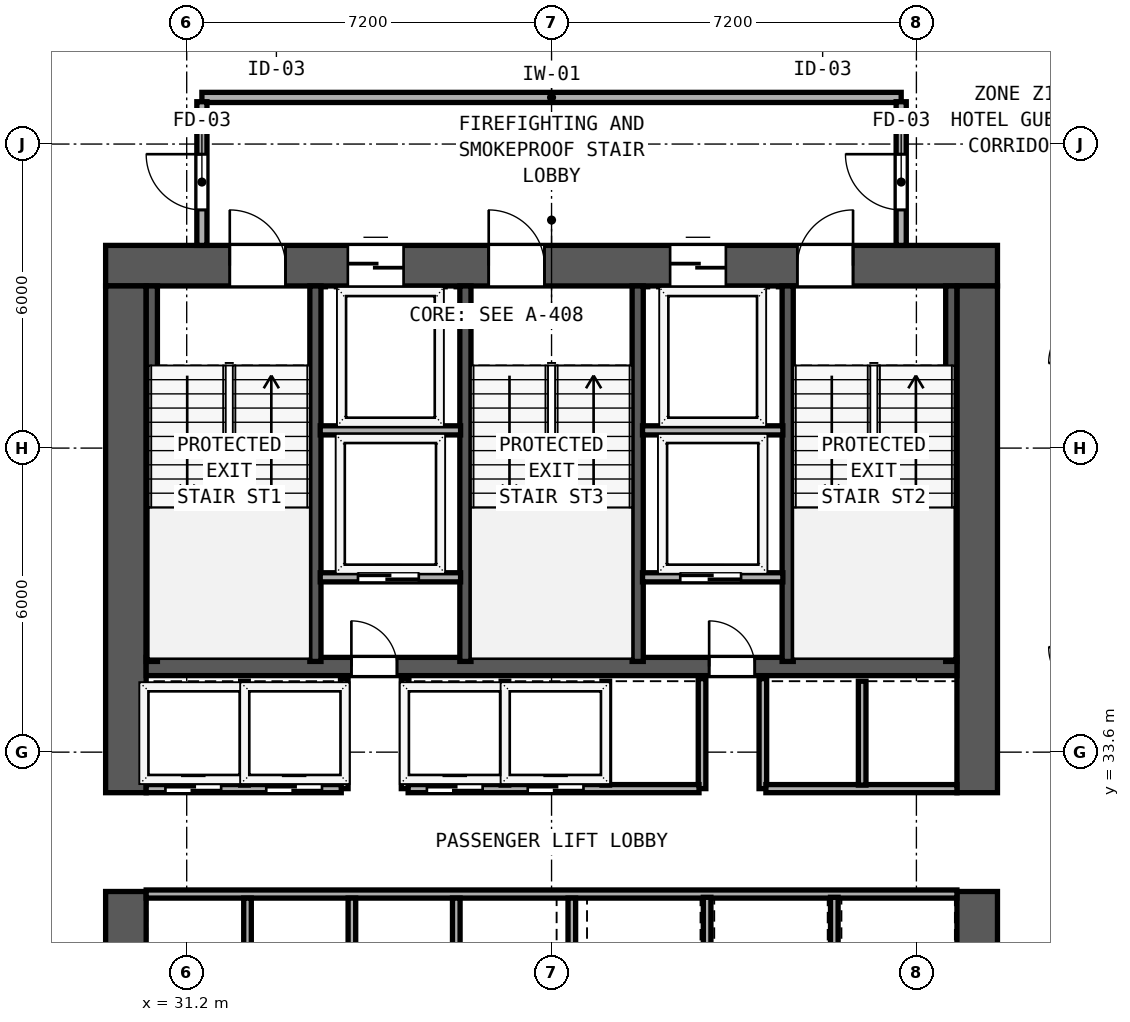
"""IFC4 building model, lengths in metres.
Left out: names, types, materials, properties, quantities, classifications, styles, units other than length and angle.
Written with IfcOpenShell. Run it as: python <this file> out.ifc"""

import sys

from ifc_helpers import new_model, si_unit, direction, frame, frame_2d, origin, place, context, subcontext, project, spatial, rectangle, extrude, element, fill, save


model = new_model("IFC4")
c1 = context("Model", 3, precision=1e-05, world=origin(), true_north=direction((0.0, 1.0)))
c2 = subcontext(c1, "Body", "Model", "MODEL_VIEW")
j1 = project(units=[si_unit("LENGTHUNIT", "METRE"), si_unit("PLANEANGLEUNIT", "RADIAN")], contexts=[c1])
p1 = place(None, origin())
s1 = spatial("IfcSite", under=j1, at=p1, CompositionType="ELEMENT")
p2 = place(p1, origin())
s2 = spatial("IfcBuilding", under=s1, at=p2, CompositionType="ELEMENT")
p3 = place(p2, frame((0.0, 0.0, 31.6)))
s3 = spatial("IfcBuildingStorey", under=s2, at=p3, CompositionType="ELEMENT", Elevation=31.6)
p4 = place(p3, frame((29.6, 43.2, 0.0), z_axis=(0.0, 0.0, 1.0), x_axis=(1.0, 0.0, 0.0)))
e1 = element("IfcWall", 1, at=p4, inside=s3, PredefinedType="SHEAR", context=c2, shape_type="SweptSolid", body=[
    extrude(rectangle(XDim=17.6, YDim=0.8, at=frame_2d((8.8, 0.0))), origin(), (0.0, 0.0, 1.0), 3.6),
])
p5 = place(p4, frame((2.45, 0.0, 0.0)))
e2 = element("IfcOpeningElement", 2, at=p5, cuts=e1, PredefinedType="OPENING", context=c2, shape_type="SweptSolid", body=[
    extrude(rectangle(XDim=1.1, YDim=2.15, at=frame_2d((0.55, 1.075))), frame((0.0, 0.41, 0.0), z_axis=(0.0, -1.0, 0.0), x_axis=(1.0, 0.0, 0.0)), (0.0, 0.0, 1.0), 0.82),
])
p6 = place(p4, frame((7.56, 0.0, 0.0)))
e3 = element("IfcOpeningElement", 3, at=p6, cuts=e1, PredefinedType="OPENING", context=c2, shape_type="SweptSolid", body=[
    extrude(rectangle(XDim=1.1, YDim=2.15, at=frame_2d((0.55, 1.075))), frame((0.0, 0.41, 0.0), z_axis=(0.0, -1.0, 0.0), x_axis=(1.0, 0.0, 0.0)), (0.0, 0.0, 1.0), 0.82),
])
p7 = place(p4, frame((13.65, 0.0, 0.0)))
e4 = element("IfcOpeningElement", 4, at=p7, cuts=e1, PredefinedType="OPENING", context=c2, shape_type="SweptSolid", body=[
    extrude(rectangle(XDim=1.1, YDim=2.15, at=frame_2d((0.55, 1.075))), frame((0.0, 0.41, 0.0), z_axis=(0.0, -1.0, 0.0), x_axis=(1.0, 0.0, 0.0)), (0.0, 0.0, 1.0), 0.82),
])
p8 = place(p4, frame((4.78, 0.0, 0.0)))
e5 = element("IfcOpeningElement", 5, at=p8, cuts=e1, PredefinedType="OPENING", context=c2, shape_type="SweptSolid", body=[
    extrude(rectangle(XDim=1.1, YDim=2.2, at=frame_2d((0.55, 1.1))), frame((0.0, 0.41, 0.0), z_axis=(0.0, -1.0, 0.0), x_axis=(1.0, 0.0, 0.0)), (0.0, 0.0, 1.0), 0.82),
])
p9 = place(p4, frame((11.14, 0.0, 0.0)))
e6 = element("IfcOpeningElement", 6, at=p9, cuts=e1, PredefinedType="OPENING", context=c2, shape_type="SweptSolid", body=[
    extrude(rectangle(XDim=1.1, YDim=2.2, at=frame_2d((0.55, 1.1))), frame((0.0, 0.41, 0.0), z_axis=(0.0, -1.0, 0.0), x_axis=(1.0, 0.0, 0.0)), (0.0, 0.0, 1.0), 0.82),
])
p10 = place(p3, frame((30.0, 26.8, 0.0), z_axis=(0.0, 0.0, 1.0), x_axis=(0.0, 1.0, 0.0)))
e7 = element("IfcWall", 7, at=p10, inside=s3, PredefinedType="SHEAR", context=c2, shape_type="SweptSolid", body=[
    extrude(rectangle(XDim=4.05, YDim=0.8, at=frame_2d((2.025, 0.0))), origin(), (0.0, 0.0, 1.0), 3.6),
])
p11 = place(p3, frame((30.0, 32.8, 0.0), z_axis=(0.0, 0.0, 1.0), x_axis=(0.0, 1.0, 0.0)))
e8 = element("IfcWall", 8, at=p11, inside=s3, PredefinedType="SHEAR", context=c2, shape_type="SweptSolid", body=[
    extrude(rectangle(XDim=10.0, YDim=0.8, at=frame_2d((5.0, 0.0))), origin(), (0.0, 0.0, 1.0), 3.6),
])
p12 = place(p3, frame((46.8, 26.8, 0.0), z_axis=(0.0, 0.0, 1.0), x_axis=(0.0, 1.0, 0.0)))
e9 = element("IfcWall", 9, at=p12, inside=s3, PredefinedType="SHEAR", context=c2, shape_type="SweptSolid", body=[
    extrude(rectangle(XDim=4.05, YDim=0.8, at=frame_2d((2.025, 0.0))), origin(), (0.0, 0.0, 1.0), 3.6),
])
p13 = place(p3, frame((46.8, 32.8, 0.0), z_axis=(0.0, 0.0, 1.0), x_axis=(0.0, 1.0, 0.0)))
e10 = element("IfcWall", 10, at=p13, inside=s3, PredefinedType="SHEAR", context=c2, shape_type="SweptSolid", body=[
    extrude(rectangle(XDim=10.0, YDim=0.8, at=frame_2d((5.0, 0.0))), origin(), (0.0, 0.0, 1.0), 3.6),
])
p14 = place(p3, frame((30.4, 35.29, 0.0), z_axis=(0.0, 0.0, 1.0), x_axis=(1.0, 0.0, 0.0)))
e11 = element("IfcWall", 11, at=p14, inside=s3, PredefinedType="SHEAR", context=c2, shape_type="SweptSolid", body=[
    extrude(rectangle(XDim=16.0, YDim=0.36, at=frame_2d((8.0, 0.0))), origin(), (0.0, 0.0, 1.0), 3.6),
])
p15 = place(p14, frame((4.95, 0.0, 0.0), z_axis=(0.0, 0.0, 1.0), x_axis=(-1.0, 0.0, 0.0)))
e12 = element("IfcOpeningElement", 12, at=p15, cuts=e11, PredefinedType="OPENING", context=c2, shape_type="SweptSolid", body=[
    extrude(rectangle(XDim=0.9, YDim=2.1, at=frame_2d((0.45, 1.05))), frame((0.0, 0.19, 0.0), z_axis=(0.0, -1.0, 0.0), x_axis=(1.0, 0.0, 0.0)), (0.0, 0.0, 1.0), 0.38),
])
p16 = place(p14, frame((12.01, 0.0, 0.0), z_axis=(0.0, 0.0, 1.0), x_axis=(-1.0, 0.0, 0.0)))
e13 = element("IfcOpeningElement", 13, at=p16, cuts=e11, PredefinedType="OPENING", context=c2, shape_type="SweptSolid", body=[
    extrude(rectangle(XDim=0.9, YDim=2.1, at=frame_2d((0.45, 1.05))), frame((0.0, 0.19, 0.0), z_axis=(0.0, -1.0, 0.0), x_axis=(1.0, 0.0, 0.0)), (0.0, 0.0, 1.0), 0.38),
])
for number, where, z_axis, x_axis in (
    (14, (30.512, 35.39, 0.0), (0.0, 0.0, 1.0), (0.0, 1.0, 0.0)),
    (15, (33.74, 35.39, 0.0), (0.0, 0.0, 1.0), (0.0, 1.0, 0.0)),
    (16, (36.7, 35.39, 0.0), (0.0, 0.0, 1.0), (0.0, 1.0, 0.0)),
    (17, (40.1, 35.39, 0.0), (0.0, 0.0, 1.0), (0.0, 1.0, 0.0)),
    (18, (43.06, 35.39, 0.0), (0.0, 0.0, 1.0), (0.0, 1.0, 0.0)),
    (19, (46.288, 35.39, 0.0), (0.0, 0.0, 1.0), (0.0, 1.0, 0.0)),
):
    element("IfcWall", number, at=place(p3, frame(where, z_axis=z_axis, x_axis=x_axis)), inside=s3, PredefinedType="SHEAR", context=c2, shape_type="SweptSolid", body=[
        extrude(rectangle(XDim=7.41, YDim=0.22, at=frame_2d((3.705, 0.0))), origin(), (0.0, 0.0, 1.0), 3.6),
    ])
p17 = place(p3, frame((31.5, 46.52, 0.0), z_axis=(0.0, 0.0, 1.0), x_axis=(1.0, 0.0, 0.0)))
e20 = element("IfcWall", 20, at=p17, inside=s3, PredefinedType="SOLIDWALL", context=c2, shape_type="SweptSolid", body=[
    extrude(rectangle(XDim=13.8, YDim=0.2, at=frame_2d((6.9, 0.0))), origin(), (0.0, 0.0, 1.0), 3.6),
])
p18 = place(p3, frame((31.5, 43.6, 0.0), z_axis=(0.0, 0.0, 1.0), x_axis=(0.0, 1.0, 0.0)))
e21 = element("IfcWall", 21, at=p18, inside=s3, PredefinedType="SOLIDWALL", context=c2, shape_type="SweptSolid", body=[
    extrude(rectangle(XDim=2.835, YDim=0.2, at=frame_2d((1.417, 0.0))), origin(), (0.0, 0.0, 1.0), 3.6),
])
p19 = place(p18, frame((1.8, 0.0, 0.0), z_axis=(0.0, 0.0, 1.0), x_axis=(-1.0, 0.0, 0.0)))
e22 = element("IfcOpeningElement", 22, at=p19, cuts=e21, PredefinedType="OPENING", context=c2, shape_type="SweptSolid", body=[
    extrude(rectangle(XDim=1.1, YDim=2.15, at=frame_2d((0.55, 1.075))), frame((0.0, 0.11, 0.0), z_axis=(0.0, -1.0, 0.0), x_axis=(1.0, 0.0, 0.0)), (0.0, 0.0, 1.0), 0.22),
])
p20 = place(p3, frame((45.3, 43.6, 0.0), z_axis=(0.0, 0.0, 1.0), x_axis=(0.0, 1.0, 0.0)))
e23 = element("IfcWall", 23, at=p20, inside=s3, PredefinedType="SOLIDWALL", context=c2, shape_type="SweptSolid", body=[
    extrude(rectangle(XDim=2.835, YDim=0.2, at=frame_2d((1.417, 0.0))), origin(), (0.0, 0.0, 1.0), 3.6),
])
p21 = place(p20, frame((0.7, 0.0, 0.0)))
e24 = element("IfcOpeningElement", 24, at=p21, cuts=e23, PredefinedType="OPENING", context=c2, shape_type="SweptSolid", body=[
    extrude(rectangle(XDim=1.1, YDim=2.15, at=frame_2d((0.55, 1.075))), frame((0.0, 0.11, 0.0), z_axis=(0.0, -1.0, 0.0), x_axis=(1.0, 0.0, 0.0)), (0.0, 0.0, 1.0), 0.22),
])
for number, where, z_axis, x_axis in (
    (25, (33.835, 39.95, 0.0), (0.0, 0.0, 1.0), (1.0, 0.0, 0.0)),
    (26, (40.195, 39.95, 0.0), (0.0, 0.0, 1.0), (1.0, 0.0, 0.0)),
):
    element("IfcWall", number, at=place(p3, frame(where, z_axis=z_axis, x_axis=x_axis)), inside=s3, PredefinedType="SOLIDWALL", context=c2, shape_type="SweptSolid", body=[
        extrude(rectangle(XDim=2.77, YDim=0.18, at=frame_2d((1.385, 0.0))), origin(), (0.0, 0.0, 1.0), 3.6),
    ])
p22 = place(p3, frame((33.835, 37.05, 0.0), z_axis=(0.0, 0.0, 1.0), x_axis=(1.0, 0.0, 0.0)))
e27 = element("IfcWall", 27, at=p22, inside=s3, PredefinedType="SOLIDWALL", context=c2, shape_type="SweptSolid", body=[
    extrude(rectangle(XDim=2.77, YDim=0.18, at=frame_2d((1.385, 0.0))), origin(), (0.0, 0.0, 1.0), 3.6),
])
p23 = place(p22, frame((1.945, 0.0, 0.0), z_axis=(0.0, 0.0, 1.0), x_axis=(-1.0, 0.0, 0.0)))
e28 = element("IfcOpeningElement", 28, at=p23, cuts=e27, PredefinedType="OPENING", context=c2, shape_type="SweptSolid", body=[
    extrude(rectangle(XDim=1.2, YDim=2.2, at=frame_2d((0.6, 1.1))), frame((0.0, 0.1, 0.0), z_axis=(0.0, -1.0, 0.0), x_axis=(1.0, 0.0, 0.0)), (0.0, 0.0, 1.0), 0.2),
])
for number, where, z_axis, x_axis in (
    (29, (34.31, 32.88, 0.0), (0.0, 0.0, 1.0), (0.0, 1.0, 0.0)),
    (30, (35.51, 32.88, 0.0), (0.0, 0.0, 1.0), (0.0, 1.0, 0.0)),
):
    element("IfcWall", number, at=place(p3, frame(where, z_axis=z_axis, x_axis=x_axis)), inside=s3, PredefinedType="SOLIDWALL", context=c2, shape_type="SweptSolid", body=[
        extrude(rectangle(XDim=2.17, YDim=0.15, at=frame_2d((1.085, 0.0))), origin(), (0.0, 0.0, 1.0), 3.6),
    ])
p24 = place(p3, frame((40.195, 37.05, 0.0), z_axis=(0.0, 0.0, 1.0), x_axis=(1.0, 0.0, 0.0)))
e31 = element("IfcWall", 31, at=p24, inside=s3, PredefinedType="SOLIDWALL", context=c2, shape_type="SweptSolid", body=[
    extrude(rectangle(XDim=2.77, YDim=0.18, at=frame_2d((1.385, 0.0))), origin(), (0.0, 0.0, 1.0), 3.6),
])
p25 = place(p24, frame((1.945, 0.0, 0.0), z_axis=(0.0, 0.0, 1.0), x_axis=(-1.0, 0.0, 0.0)))
e32 = element("IfcOpeningElement", 32, at=p25, cuts=e31, PredefinedType="OPENING", context=c2, shape_type="SweptSolid", body=[
    extrude(rectangle(XDim=1.2, YDim=2.2, at=frame_2d((0.6, 1.1))), frame((0.0, 0.1, 0.0), z_axis=(0.0, -1.0, 0.0), x_axis=(1.0, 0.0, 0.0)), (0.0, 0.0, 1.0), 0.2),
])
for number, where, z_axis, x_axis in (
    (33, (41.37, 32.88, 0.0), (0.0, 0.0, 1.0), (0.0, 1.0, 0.0)),
    (34, (42.57, 32.88, 0.0), (0.0, 0.0, 1.0), (0.0, 1.0, 0.0)),
):
    element("IfcWall", number, at=place(p3, frame(where, z_axis=z_axis, x_axis=x_axis)), inside=s3, PredefinedType="SOLIDWALL", context=c2, shape_type="SweptSolid", body=[
        extrude(rectangle(XDim=2.17, YDim=0.15, at=frame_2d((1.085, 0.0))), origin(), (0.0, 0.0, 1.0), 3.6),
    ])
p26 = place(p3, frame((30.4, 32.88, 0.0), z_axis=(0.0, 0.0, 1.0), x_axis=(1.0, 0.0, 0.0)))
e35 = element("IfcWall", 35, at=p26, inside=s3, PredefinedType="SOLIDWALL", context=c2, shape_type="SweptSolid", body=[
    extrude(rectangle(XDim=3.85, YDim=0.16, at=frame_2d((1.925, 0.0))), origin(), (0.0, 0.0, 1.0), 3.6),
])
p27 = place(p26, frame((1.48, 0.0, 0.0), z_axis=(0.0, 0.0, 1.0), x_axis=(-1.0, 0.0, 0.0)))
e36 = element("IfcOpeningElement", 36, at=p27, cuts=e35, PredefinedType="OPENING", context=c2, shape_type="SweptSolid", body=[
    extrude(rectangle(XDim=1.1, YDim=2.2, at=frame_2d((0.55, 1.1))), frame((0.0, 0.09, 0.0), z_axis=(0.0, -1.0, 0.0), x_axis=(1.0, 0.0, 0.0)), (0.0, 0.0, 1.0), 0.18),
])
p28 = place(p26, frame((3.47, 0.0, 0.0), z_axis=(0.0, 0.0, 1.0), x_axis=(-1.0, 0.0, 0.0)))
e37 = element("IfcOpeningElement", 37, at=p28, cuts=e35, PredefinedType="OPENING", context=c2, shape_type="SweptSolid", body=[
    extrude(rectangle(XDim=1.1, YDim=2.2, at=frame_2d((0.55, 1.1))), frame((0.0, 0.09, 0.0), z_axis=(0.0, -1.0, 0.0), x_axis=(1.0, 0.0, 0.0)), (0.0, 0.0, 1.0), 0.18),
])
p29 = place(p3, frame((35.57, 32.88, 0.0), z_axis=(0.0, 0.0, 1.0), x_axis=(1.0, 0.0, 0.0)))
e38 = element("IfcWall", 38, at=p29, inside=s3, PredefinedType="SOLIDWALL", context=c2, shape_type="SweptSolid", body=[
    extrude(rectangle(XDim=5.74, YDim=0.16, at=frame_2d((2.87, 0.0))), origin(), (0.0, 0.0, 1.0), 3.6),
])
p30 = place(p29, frame((1.47, 0.0, 0.0), z_axis=(0.0, 0.0, 1.0), x_axis=(-1.0, 0.0, 0.0)))
e39 = element("IfcOpeningElement", 39, at=p30, cuts=e38, PredefinedType="OPENING", context=c2, shape_type="SweptSolid", body=[
    extrude(rectangle(XDim=1.1, YDim=2.2, at=frame_2d((0.55, 1.1))), frame((0.0, 0.09, 0.0), z_axis=(0.0, -1.0, 0.0), x_axis=(1.0, 0.0, 0.0)), (0.0, 0.0, 1.0), 0.18),
])
p31 = place(p29, frame((3.46, 0.0, 0.0), z_axis=(0.0, 0.0, 1.0), x_axis=(-1.0, 0.0, 0.0)))
e40 = element("IfcOpeningElement", 40, at=p31, cuts=e38, PredefinedType="OPENING", context=c2, shape_type="SweptSolid", body=[
    extrude(rectangle(XDim=1.1, YDim=2.2, at=frame_2d((0.55, 1.1))), frame((0.0, 0.09, 0.0), z_axis=(0.0, -1.0, 0.0), x_axis=(1.0, 0.0, 0.0)), (0.0, 0.0, 1.0), 0.18),
])
p32 = place(p3, frame((42.63, 32.88, 0.0), z_axis=(0.0, 0.0, 1.0), x_axis=(1.0, 0.0, 0.0)))
e41 = element("IfcWall", 41, at=p32, inside=s3, PredefinedType="SOLIDWALL", context=c2, shape_type="SweptSolid", body=[
    extrude(rectangle(XDim=3.77, YDim=0.16, at=frame_2d((1.885, 0.0))), origin(), (0.0, 0.0, 1.0), 3.6),
])
for number, where, z_axis, x_axis in (
    (42, (32.34, 32.95, 0.0), (0.0, 0.0, 1.0), (0.0, 1.0, 0.0)),
    (43, (37.48, 32.95, 0.0), (0.0, 0.0, 1.0), (0.0, 1.0, 0.0)),
    (44, (39.47, 32.95, 0.0), (0.0, 0.0, 1.0), (0.0, 1.0, 0.0)),
    (45, (44.53, 32.95, 0.0), (0.0, 0.0, 1.0), (0.0, 1.0, 0.0)),
):
    element("IfcWall", number, at=place(p3, frame(where, z_axis=z_axis, x_axis=x_axis)), inside=s3, PredefinedType="SOLIDWALL", context=c2, shape_type="SweptSolid", body=[
        extrude(rectangle(XDim=2.05, YDim=0.15, at=frame_2d((1.025, 0.0))), origin(), (0.0, 0.0, 1.0), 3.6),
    ])
p33 = place(p3, frame((30.4, 30.8, 0.0), z_axis=(0.0, 0.0, 1.0), x_axis=(1.0, 0.0, 0.0)))
e46 = element("IfcWall", 46, at=p33, inside=s3, PredefinedType="SOLIDWALL", context=c2, shape_type="SweptSolid", body=[
    extrude(rectangle(XDim=16.0, YDim=0.16, at=frame_2d((8.0, 0.0))), origin(), (0.0, 0.0, 1.0), 3.6),
])
for number, where, z_axis, x_axis in (
    (47, (32.4, 28.735, 0.0), (0.0, 0.0, 1.0), (0.0, 1.0, 0.0)),
    (48, (34.46, 28.735, 0.0), (0.0, 0.0, 1.0), (0.0, 1.0, 0.0)),
    (49, (36.52, 28.735, 0.0), (0.0, 0.0, 1.0), (0.0, 1.0, 0.0)),
    (50, (38.8, 28.735, 0.0), (0.0, 0.0, 1.0), (0.0, 1.0, 0.0)),
):
    element("IfcWall", number, at=place(p3, frame(where, z_axis=z_axis, x_axis=x_axis)), inside=s3, PredefinedType="SOLIDWALL", context=c2, shape_type="SweptSolid", body=[
        extrude(rectangle(XDim=1.985, YDim=0.15, at=frame_2d((0.992, 0.0))), origin(), (0.0, 0.0, 1.0), 3.6),
    ])
for number, where, z_axis, x_axis in (
    (51, (41.47, 28.75, 0.0), (0.0, 0.0, 1.0), (0.0, 1.0, 0.0)),
    (52, (43.98, 28.75, 0.0), (0.0, 0.0, 1.0), (0.0, 1.0, 0.0)),
):
    element("IfcWall", number, at=place(p3, frame(where, z_axis=z_axis, x_axis=x_axis)), inside=s3, PredefinedType="SOLIDWALL", context=c2, shape_type="SweptSolid", body=[
        extrude(rectangle(XDim=1.985, YDim=0.15, at=frame_2d((0.993, 0.0))), origin(), (0.0, 0.0, 1.0), 3.6),
    ])
p34 = place(p5, origin())
e53 = element("IfcDoor", 53, at=p34, inside=s3, OperationType="SINGLE_SWING_LEFT", PredefinedType="DOOR", context=c2, shape_type="SweptSolid", body=[
    extrude(rectangle(XDim=1.1, YDim=2.15, at=frame_2d((0.55, 1.075))), frame((0.0, 0.185, 0.0), z_axis=(0.0, -1.0, 0.0), x_axis=(1.0, 0.0, 0.0)), (0.0, 0.0, 1.0), 0.05),
])
fill(e2, e53)
p35 = place(p6, origin())
e54 = element("IfcDoor", 54, at=p35, inside=s3, OperationType="SINGLE_SWING_LEFT", PredefinedType="DOOR", context=c2, shape_type="SweptSolid", body=[
    extrude(rectangle(XDim=1.1, YDim=2.15, at=frame_2d((0.55, 1.075))), frame((0.0, 0.185, 0.0), z_axis=(0.0, -1.0, 0.0), x_axis=(1.0, 0.0, 0.0)), (0.0, 0.0, 1.0), 0.05),
])
fill(e3, e54)
p36 = place(p7, origin())
e55 = element("IfcDoor", 55, at=p36, inside=s3, OperationType="SINGLE_SWING_RIGHT", PredefinedType="DOOR", context=c2, shape_type="SweptSolid", body=[
    extrude(rectangle(XDim=1.1, YDim=2.15, at=frame_2d((0.55, 1.075))), frame((0.0, 0.185, 0.0), z_axis=(0.0, -1.0, 0.0), x_axis=(1.0, 0.0, 0.0)), (0.0, 0.0, 1.0), 0.05),
])
fill(e4, e55)
p37 = place(p19, origin())
e56 = element("IfcDoor", 56, at=p37, inside=s3, OperationType="SINGLE_SWING_LEFT", PredefinedType="DOOR", context=c2, shape_type="SweptSolid", body=[
    extrude(rectangle(XDim=1.1, YDim=2.15, at=frame_2d((0.55, 1.075))), frame((0.0, 0.025, 0.0), z_axis=(0.0, -1.0, 0.0), x_axis=(1.0, 0.0, 0.0)), (0.0, 0.0, 1.0), 0.05),
])
fill(e22, e56)
p38 = place(p21, origin())
e57 = element("IfcDoor", 57, at=p38, inside=s3, OperationType="SINGLE_SWING_RIGHT", PredefinedType="DOOR", context=c2, shape_type="SweptSolid", body=[
    extrude(rectangle(XDim=1.1, YDim=2.15, at=frame_2d((0.55, 1.075))), frame((0.0, 0.025, 0.0), z_axis=(0.0, -1.0, 0.0), x_axis=(1.0, 0.0, 0.0)), (0.0, 0.0, 1.0), 0.05),
])
fill(e24, e57)
p39 = place(p8, origin())
e58 = element("IfcDoor", 58, at=p39, inside=s3, OperationType="SLIDING_TO_LEFT", PredefinedType="DOOR", context=c2, shape_type="SweptSolid", body=[
    extrude(rectangle(XDim=1.1, YDim=2.2, at=frame_2d((0.55, 1.1))), frame((0.0, 0.185, 0.0), z_axis=(0.0, -1.0, 0.0), x_axis=(1.0, 0.0, 0.0)), (0.0, 0.0, 1.0), 0.05),
])
fill(e5, e58)
p40 = place(p9, origin())
e59 = element("IfcDoor", 59, at=p40, inside=s3, OperationType="SLIDING_TO_LEFT", PredefinedType="DOOR", context=c2, shape_type="SweptSolid", body=[
    extrude(rectangle(XDim=1.1, YDim=2.2, at=frame_2d((0.55, 1.1))), frame((0.0, 0.185, 0.0), z_axis=(0.0, -1.0, 0.0), x_axis=(1.0, 0.0, 0.0)), (0.0, 0.0, 1.0), 0.05),
])
fill(e6, e59)
p41 = place(p23, origin())
e60 = element("IfcDoor", 60, at=p41, inside=s3, OperationType="SLIDING_TO_RIGHT", PredefinedType="DOOR", context=c2, shape_type="SweptSolid", body=[
    extrude(rectangle(XDim=1.2, YDim=2.2, at=frame_2d((0.6, 1.1))), frame((0.0, 0.025, 0.0), z_axis=(0.0, -1.0, 0.0), x_axis=(1.0, 0.0, 0.0)), (0.0, 0.0, 1.0), 0.05),
])
fill(e28, e60)
p42 = place(p15, origin())
e61 = element("IfcDoor", 61, at=p42, inside=s3, OperationType="SINGLE_SWING_RIGHT", PredefinedType="DOOR", context=c2, shape_type="SweptSolid", body=[
    extrude(rectangle(XDim=0.9, YDim=2.1, at=frame_2d((0.45, 1.05))), frame((0.0, 0.025, 0.0), z_axis=(0.0, -1.0, 0.0), x_axis=(1.0, 0.0, 0.0)), (0.0, 0.0, 1.0), 0.05),
])
fill(e12, e61)
p43 = place(p25, origin())
e62 = element("IfcDoor", 62, at=p43, inside=s3, OperationType="SLIDING_TO_RIGHT", PredefinedType="DOOR", context=c2, shape_type="SweptSolid", body=[
    extrude(rectangle(XDim=1.2, YDim=2.2, at=frame_2d((0.6, 1.1))), frame((0.0, 0.025, 0.0), z_axis=(0.0, -1.0, 0.0), x_axis=(1.0, 0.0, 0.0)), (0.0, 0.0, 1.0), 0.05),
])
fill(e32, e62)
p44 = place(p16, origin())
e63 = element("IfcDoor", 63, at=p44, inside=s3, OperationType="SINGLE_SWING_RIGHT", PredefinedType="DOOR", context=c2, shape_type="SweptSolid", body=[
    extrude(rectangle(XDim=0.9, YDim=2.1, at=frame_2d((0.45, 1.05))), frame((0.0, 0.025, 0.0), z_axis=(0.0, -1.0, 0.0), x_axis=(1.0, 0.0, 0.0)), (0.0, 0.0, 1.0), 0.05),
])
fill(e13, e63)
p45 = place(p27, origin())
e64 = element("IfcDoor", 64, at=p45, inside=s3, OperationType="SLIDING_TO_LEFT", PredefinedType="DOOR", context=c2, shape_type="SweptSolid", body=[
    extrude(rectangle(XDim=1.1, YDim=2.2, at=frame_2d((0.55, 1.1))), frame((0.0, 0.025, 0.0), z_axis=(0.0, -1.0, 0.0), x_axis=(1.0, 0.0, 0.0)), (0.0, 0.0, 1.0), 0.05),
])
fill(e36, e64)
p46 = place(p28, origin())
e65 = element("IfcDoor", 65, at=p46, inside=s3, OperationType="SLIDING_TO_LEFT", PredefinedType="DOOR", context=c2, shape_type="SweptSolid", body=[
    extrude(rectangle(XDim=1.1, YDim=2.2, at=frame_2d((0.55, 1.1))), frame((0.0, 0.025, 0.0), z_axis=(0.0, -1.0, 0.0), x_axis=(1.0, 0.0, 0.0)), (0.0, 0.0, 1.0), 0.05),
])
fill(e37, e65)
p47 = place(p30, origin())
e66 = element("IfcDoor", 66, at=p47, inside=s3, OperationType="SLIDING_TO_LEFT", PredefinedType="DOOR", context=c2, shape_type="SweptSolid", body=[
    extrude(rectangle(XDim=1.1, YDim=2.2, at=frame_2d((0.55, 1.1))), frame((0.0, 0.025, 0.0), z_axis=(0.0, -1.0, 0.0), x_axis=(1.0, 0.0, 0.0)), (0.0, 0.0, 1.0), 0.05),
])
fill(e39, e66)
p48 = place(p31, origin())
e67 = element("IfcDoor", 67, at=p48, inside=s3, OperationType="SLIDING_TO_LEFT", PredefinedType="DOOR", context=c2, shape_type="SweptSolid", body=[
    extrude(rectangle(XDim=1.1, YDim=2.2, at=frame_2d((0.55, 1.1))), frame((0.0, 0.025, 0.0), z_axis=(0.0, -1.0, 0.0), x_axis=(1.0, 0.0, 0.0)), (0.0, 0.0, 1.0), 0.05),
])
fill(e40, e67)
save(model, sys.argv[1])
